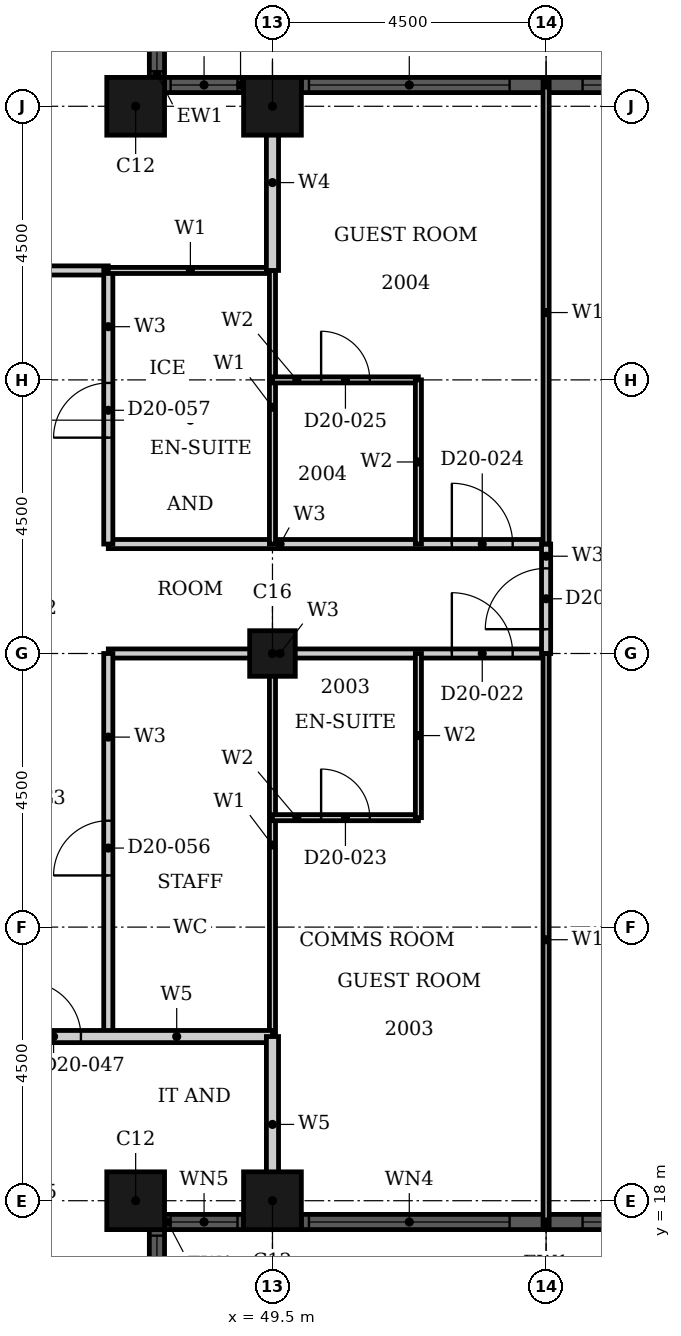
"""IFC4 building model, lengths in metres.
Left out: names, types, materials, properties, quantities, classifications, styles, units other than length and angle.
Written with IfcOpenShell. Run it as: python <this file> out.ifc"""

import sys

from ifc_helpers import new_model, si_unit, direction, frame, frame_2d, origin, origin_2d, place, context, subcontext, project, spatial, rectangle, hollow_rectangle, extrude, element, fill, save


model = new_model("IFC4")
c1 = context("Model", 3, precision=1e-05, world=origin(), true_north=direction((0.0, 1.0)))
c2 = subcontext(c1, "Body", "Model", "MODEL_VIEW")
j1 = project(units=[si_unit("LENGTHUNIT", "METRE"), si_unit("PLANEANGLEUNIT", "RADIAN")], contexts=[c1])
p1 = place(None, origin())
s1 = spatial("IfcSite", under=j1, at=p1, CompositionType="ELEMENT")
p2 = place(p1, origin())
s2 = spatial("IfcBuilding", under=s1, at=p2, CompositionType="ELEMENT")
p3 = place(p2, frame((0.0, 0.0, 85.2)))
s3 = spatial("IfcBuildingStorey", under=s2, at=p3, CompositionType="ELEMENT", Elevation=85.2)
for number, where, z_axis, x_axis in (
    (1, (47.25, 18.0, 0.0), (0.0, 0.0, 1.0), (1.0, 0.0, 0.0)),
    (2, (49.5, 18.0, 0.0), (0.0, 0.0, 1.0), (1.0, 0.0, 0.0)),
    (3, (49.5, 36.0, 0.0), (0.0, 0.0, 1.0), (1.0, 0.0, 0.0)),
    (4, (47.25, 36.0, 0.0), (0.0, 0.0, 1.0), (1.0, 0.0, 0.0)),
):
    element("IfcColumn", number, at=place(p3, frame(where, z_axis=z_axis, x_axis=x_axis)), inside=s3, PredefinedType="COLUMN", context=c2, shape_type="SweptSolid", body=[
        extrude(hollow_rectangle(XDim=0.95, YDim=0.95, WallThickness=0.03, at=origin_2d()), origin(), (0.0, 0.0, 1.0), 3.6),
    ])
p4 = place(p3, frame((49.5, 27.0, 0.0), z_axis=(0.0, 0.0, 1.0), x_axis=(1.0, 0.0, 0.0)))
e5 = element("IfcColumn", 5, at=p4, inside=s3, PredefinedType="COLUMN", context=c2, shape_type="SweptSolid", body=[
    extrude(hollow_rectangle(XDim=0.75, YDim=0.75, WallThickness=0.024, at=origin_2d()), origin(), (0.0, 0.0, 1.0), 3.6),
])
p5 = place(p3, frame((47.6, 16.225, 0.0), z_axis=(0.0, 0.0, 1.0), x_axis=(0.0, 1.0, 0.0)))
e6 = element("IfcWall", 6, at=p5, inside=s3, PredefinedType="SOLIDWALL", context=c2, shape_type="SweptSolid", body=[
    extrude(rectangle(XDim=1.3, YDim=0.25, at=frame_2d((0.65, 0.0))), origin(), (0.0, 0.0, 1.0), 3.6),
])
p6 = place(p5, frame((0.1, 0.0, 0.9)))
e7 = element("IfcOpeningElement", 7, at=p6, cuts=e6, PredefinedType="OPENING", context=c2, shape_type="SweptSolid", body=[
    extrude(rectangle(XDim=1.1, YDim=2.08, at=frame_2d((0.55, 1.04))), frame((0.0, 0.135, 0.0), z_axis=(0.0, -1.0, 0.0), x_axis=(1.0, 0.0, 0.0)), (0.0, 0.0, 1.0), 0.27),
])
p7 = place(p3, frame((47.725, 17.65, 0.0), z_axis=(0.0, 0.0, 1.0), x_axis=(1.0, 0.0, 0.0)))
e8 = element("IfcWall", 8, at=p7, inside=s3, PredefinedType="SOLIDWALL", context=c2, shape_type="SweptSolid", body=[
    extrude(rectangle(XDim=1.3, YDim=0.25, at=frame_2d((0.65, 0.0))), origin(), (0.0, 0.0, 1.0), 3.6),
])
p8 = place(p7, frame((0.1, 0.0, 0.9)))
e9 = element("IfcOpeningElement", 9, at=p8, cuts=e8, PredefinedType="OPENING", context=c2, shape_type="SweptSolid", body=[
    extrude(rectangle(XDim=1.1, YDim=2.08, at=frame_2d((0.55, 1.04))), frame((0.0, 0.135, 0.0), z_axis=(0.0, -1.0, 0.0), x_axis=(1.0, 0.0, 0.0)), (0.0, 0.0, 1.0), 0.27),
])
p9 = place(p3, frame((49.975, 17.65, 0.0), z_axis=(0.0, 0.0, 1.0), x_axis=(1.0, 0.0, 0.0)))
e10 = element("IfcWall", 10, at=p9, inside=s3, PredefinedType="SOLIDWALL", context=c2, shape_type="SweptSolid", body=[
    extrude(rectangle(XDim=8.05, YDim=0.25, at=frame_2d((4.025, 0.0))), origin(), (0.0, 0.0, 1.0), 3.6),
])
p10 = place(p9, frame((0.125, 0.0, 0.9)))
e11 = element("IfcOpeningElement", 11, at=p10, cuts=e10, PredefinedType="OPENING", context=c2, shape_type="SweptSolid", body=[
    extrude(rectangle(XDim=3.3, YDim=2.08, at=frame_2d((1.65, 1.04))), frame((0.0, 0.135, 0.0), z_axis=(0.0, -1.0, 0.0), x_axis=(1.0, 0.0, 0.0)), (0.0, 0.0, 1.0), 0.27),
])
p11 = place(p9, frame((4.625, 0.0, 0.9)))
e12 = element("IfcOpeningElement", 12, at=p11, cuts=e10, PredefinedType="OPENING", context=c2, shape_type="SweptSolid", body=[
    extrude(rectangle(XDim=3.3, YDim=2.08, at=frame_2d((1.65, 1.04))), frame((0.0, 0.135, 0.0), z_axis=(0.0, -1.0, 0.0), x_axis=(1.0, 0.0, 0.0)), (0.0, 0.0, 1.0), 0.27),
])
p12 = place(p3, frame((58.025, 36.35, 0.0), z_axis=(0.0, 0.0, 1.0), x_axis=(-1.0, 0.0, 0.0)))
e13 = element("IfcWall", 13, at=p12, inside=s3, PredefinedType="SOLIDWALL", context=c2, shape_type="SweptSolid", body=[
    extrude(rectangle(XDim=8.05, YDim=0.25, at=frame_2d((4.025, 0.0))), origin(), (0.0, 0.0, 1.0), 3.6),
])
p13 = place(p12, frame((0.125, 0.0, 0.9)))
e14 = element("IfcOpeningElement", 14, at=p13, cuts=e13, PredefinedType="OPENING", context=c2, shape_type="SweptSolid", body=[
    extrude(rectangle(XDim=3.3, YDim=2.08, at=frame_2d((1.65, 1.04))), frame((0.0, 0.135, 0.0), z_axis=(0.0, -1.0, 0.0), x_axis=(1.0, 0.0, 0.0)), (0.0, 0.0, 1.0), 0.27),
])
p14 = place(p12, frame((4.625, 0.0, 0.9)))
e15 = element("IfcOpeningElement", 15, at=p14, cuts=e13, PredefinedType="OPENING", context=c2, shape_type="SweptSolid", body=[
    extrude(rectangle(XDim=3.3, YDim=2.08, at=frame_2d((1.65, 1.04))), frame((0.0, 0.135, 0.0), z_axis=(0.0, -1.0, 0.0), x_axis=(1.0, 0.0, 0.0)), (0.0, 0.0, 1.0), 0.27),
])
p15 = place(p3, frame((49.025, 36.35, 0.0), z_axis=(0.0, 0.0, 1.0), x_axis=(-1.0, 0.0, 0.0)))
e16 = element("IfcWall", 16, at=p15, inside=s3, PredefinedType="SOLIDWALL", context=c2, shape_type="SweptSolid", body=[
    extrude(rectangle(XDim=1.3, YDim=0.25, at=frame_2d((0.65, 0.0))), origin(), (0.0, 0.0, 1.0), 3.6),
])
p16 = place(p15, frame((0.1, 0.0, 0.9)))
e17 = element("IfcOpeningElement", 17, at=p16, cuts=e16, PredefinedType="OPENING", context=c2, shape_type="SweptSolid", body=[
    extrude(rectangle(XDim=1.1, YDim=2.08, at=frame_2d((0.55, 1.04))), frame((0.0, 0.135, 0.0), z_axis=(0.0, -1.0, 0.0), x_axis=(1.0, 0.0, 0.0)), (0.0, 0.0, 1.0), 0.27),
])
p17 = place(p3, frame((47.6, 36.475, 0.0), z_axis=(0.0, 0.0, 1.0), x_axis=(0.0, 1.0, 0.0)))
e18 = element("IfcWall", 18, at=p17, inside=s3, PredefinedType="SOLIDWALL", context=c2, shape_type="SweptSolid", body=[
    extrude(rectangle(XDim=1.3, YDim=0.25, at=frame_2d((0.65, 0.0))), origin(), (0.0, 0.0, 1.0), 3.6),
])
p18 = place(p17, frame((0.1, 0.0, 0.9)))
e19 = element("IfcOpeningElement", 19, at=p18, cuts=e18, PredefinedType="OPENING", context=c2, shape_type="SweptSolid", body=[
    extrude(rectangle(XDim=1.1, YDim=2.08, at=frame_2d((0.55, 1.04))), frame((0.0, 0.135, 0.0), z_axis=(0.0, -1.0, 0.0), x_axis=(1.0, 0.0, 0.0)), (0.0, 0.0, 1.0), 0.27),
])
p19 = place(p3, frame((46.8, 27.0, 0.0), z_axis=(0.0, 0.0, 1.0), x_axis=(1.0, 0.0, 0.0)))
e20 = element("IfcWall", 20, at=p19, inside=s3, PredefinedType="PARTITIONING", context=c2, shape_type="SweptSolid", body=[
    extrude(rectangle(XDim=7.2, YDim=0.15, at=frame_2d((3.6, 0.0))), origin(), (0.0, 0.0, 1.0), 2.58),
])
p20 = place(p19, frame((5.65, 0.0, 0.0)))
e21 = element("IfcOpeningElement", 21, at=p20, cuts=e20, PredefinedType="OPENING", context=c2, shape_type="SweptSolid", body=[
    extrude(rectangle(XDim=1.0, YDim=2.1, at=frame_2d((0.5, 1.05))), frame((0.0, 0.085, 0.0), z_axis=(0.0, -1.0, 0.0), x_axis=(1.0, 0.0, 0.0)), (0.0, 0.0, 1.0), 0.17),
])
p21 = place(p3, frame((46.8, 28.8, 0.0), z_axis=(0.0, 0.0, 1.0), x_axis=(1.0, 0.0, 0.0)))
e22 = element("IfcWall", 22, at=p21, inside=s3, PredefinedType="PARTITIONING", context=c2, shape_type="SweptSolid", body=[
    extrude(rectangle(XDim=7.2, YDim=0.15, at=frame_2d((3.6, 0.0))), origin(), (0.0, 0.0, 1.0), 3.3),
])
p22 = place(p21, frame((5.65, 0.0, 0.0)))
e23 = element("IfcOpeningElement", 23, at=p22, cuts=e22, PredefinedType="OPENING", context=c2, shape_type="SweptSolid", body=[
    extrude(rectangle(XDim=1.0, YDim=2.1, at=frame_2d((0.5, 1.05))), frame((0.0, 0.085, 0.0), z_axis=(0.0, -1.0, 0.0), x_axis=(1.0, 0.0, 0.0)), (0.0, 0.0, 1.0), 0.17),
])
p23 = place(p3, frame((33.3, 33.3, 0.0), z_axis=(0.0, 0.0, 1.0), x_axis=(1.0, 0.0, 0.0)))
e24 = element("IfcWall", 24, at=p23, inside=s3, PredefinedType="PARTITIONING", context=c2, shape_type="SweptSolid", body=[
    extrude(rectangle(XDim=13.5, YDim=0.15, at=frame_2d((6.75, 0.0))), origin(), (0.0, 0.0, 1.0), 3.3),
])
p24 = place(p23, frame((10.15, 0.0, 0.0)))
e25 = element("IfcOpeningElement", 25, at=p24, cuts=e24, PredefinedType="OPENING", context=c2, shape_type="SweptSolid", body=[
    extrude(rectangle(XDim=1.0, YDim=2.1, at=frame_2d((0.5, 1.05))), frame((0.0, 0.085, 0.0), z_axis=(0.0, -1.0, 0.0), x_axis=(1.0, 0.0, 0.0)), (0.0, 0.0, 1.0), 0.17),
])
p25 = place(p23, frame((3.15, 0.0, 0.0)))
e26 = element("IfcOpeningElement", 26, at=p25, cuts=e24, PredefinedType="OPENING", context=c2, shape_type="SweptSolid", body=[
    extrude(rectangle(XDim=0.9, YDim=2.1, at=frame_2d((0.45, 1.05))), frame((0.0, 0.085, 0.0), z_axis=(0.0, -1.0, 0.0), x_axis=(1.0, 0.0, 0.0)), (0.0, 0.0, 1.0), 0.17),
])
p26 = place(p3, frame((46.8, 28.8, 0.0), z_axis=(0.0, 0.0, 1.0), x_axis=(0.0, 1.0, 0.0)))
e27 = element("IfcWall", 27, at=p26, inside=s3, PredefinedType="PARTITIONING", context=c2, shape_type="SweptSolid", body=[
    extrude(rectangle(XDim=4.5, YDim=0.15, at=frame_2d((2.25, 0.0))), origin(), (0.0, 0.0, 1.0), 3.3),
])
p27 = place(p26, frame((1.75, 0.0, 0.0)))
e28 = element("IfcOpeningElement", 28, at=p27, cuts=e27, PredefinedType="OPENING", context=c2, shape_type="SweptSolid", body=[
    extrude(rectangle(XDim=0.9, YDim=2.1, at=frame_2d((0.45, 1.05))), frame((0.0, 0.085, 0.0), z_axis=(0.0, -1.0, 0.0), x_axis=(1.0, 0.0, 0.0)), (0.0, 0.0, 1.0), 0.17),
])
p28 = place(p3, frame((46.8, 20.7, 0.0), z_axis=(0.0, 0.0, 1.0), x_axis=(0.0, 1.0, 0.0)))
e29 = element("IfcWall", 29, at=p28, inside=s3, PredefinedType="PARTITIONING", context=c2, shape_type="SweptSolid", body=[
    extrude(rectangle(XDim=6.3, YDim=0.15, at=frame_2d((3.15, 0.0))), origin(), (0.0, 0.0, 1.0), 3.3),
])
p29 = place(p28, frame((2.65, 0.0, 0.0)))
e30 = element("IfcOpeningElement", 30, at=p29, cuts=e29, PredefinedType="OPENING", context=c2, shape_type="SweptSolid", body=[
    extrude(rectangle(XDim=0.9, YDim=2.1, at=frame_2d((0.45, 1.05))), frame((0.0, 0.085, 0.0), z_axis=(0.0, -1.0, 0.0), x_axis=(1.0, 0.0, 0.0)), (0.0, 0.0, 1.0), 0.17),
])
p30 = place(p3, frame((54.0, 27.0, 0.0), z_axis=(0.0, 0.0, 1.0), x_axis=(0.0, 1.0, 0.0)))
e31 = element("IfcWall", 31, at=p30, inside=s3, PredefinedType="PARTITIONING", context=c2, shape_type="SweptSolid", body=[
    extrude(rectangle(XDim=1.8, YDim=0.15, at=frame_2d((0.9, 0.0))), origin(), (0.0, 0.0, 1.0), 3.3),
])
p31 = place(p30, frame((0.4, 0.0, 0.0)))
e32 = element("IfcOpeningElement", 32, at=p31, cuts=e31, PredefinedType="OPENING", context=c2, shape_type="SweptSolid", body=[
    extrude(rectangle(XDim=1.0, YDim=2.1, at=frame_2d((0.5, 1.05))), frame((0.0, 0.085, 0.0), z_axis=(0.0, -1.0, 0.0), x_axis=(1.0, 0.0, 0.0)), (0.0, 0.0, 1.0), 0.17),
])
p32 = place(p3, frame((46.8, 33.3, 0.0), z_axis=(0.0, 0.0, 1.0), x_axis=(1.0, 0.0, 0.0)))
e33 = element("IfcWall", 33, at=p32, inside=s3, PredefinedType="PARTITIONING", context=c2, shape_type="SweptSolid", body=[
    extrude(rectangle(XDim=2.7, YDim=0.1, at=frame_2d((1.35, 0.0))), origin(), (0.0, 0.0, 1.0), 3.3),
])
p33 = place(p3, frame((49.5, 28.8, 0.0), z_axis=(0.0, 0.0, 1.0), x_axis=(0.0, 1.0, 0.0)))
e34 = element("IfcWall", 34, at=p33, inside=s3, PredefinedType="PARTITIONING", context=c2, shape_type="SweptSolid", body=[
    extrude(rectangle(XDim=4.5, YDim=0.1, at=frame_2d((2.25, 0.0))), origin(), (0.0, 0.0, 1.0), 2.38),
])
p34 = place(p3, frame((49.5, 20.7, 0.0), z_axis=(0.0, 0.0, 1.0), x_axis=(0.0, 1.0, 0.0)))
e35 = element("IfcWall", 35, at=p34, inside=s3, PredefinedType="PARTITIONING", context=c2, shape_type="SweptSolid", body=[
    extrude(rectangle(XDim=6.3, YDim=0.1, at=frame_2d((3.15, 0.0))), origin(), (0.0, 0.0, 1.0), 2.38),
])
p35 = place(p3, frame((54.0, 28.8, 0.0), z_axis=(0.0, 0.0, 1.0), x_axis=(0.0, 1.0, 0.0)))
e36 = element("IfcWall", 36, at=p35, inside=s3, PredefinedType="PARTITIONING", context=c2, shape_type="SweptSolid", body=[
    extrude(rectangle(XDim=7.615, YDim=0.1, at=frame_2d((3.808, 0.0))), origin(), (0.0, 0.0, 1.0), 3.3),
])
p36 = place(p3, frame((54.0, 17.585, 0.0), z_axis=(0.0, 0.0, 1.0), x_axis=(0.0, 1.0, 0.0)))
e37 = element("IfcWall", 37, at=p36, inside=s3, PredefinedType="PARTITIONING", context=c2, shape_type="SweptSolid", body=[
    extrude(rectangle(XDim=9.415, YDim=0.1, at=frame_2d((4.708, 0.0))), origin(), (0.0, 0.0, 1.0), 3.3),
])
p37 = place(p3, frame((49.5, 33.3, 0.0), z_axis=(0.0, 0.0, 1.0), x_axis=(0.0, 1.0, 0.0)))
e38 = element("IfcWall", 38, at=p37, inside=s3, PredefinedType="PARTITIONING", context=c2, shape_type="SweptSolid", body=[
    extrude(rectangle(XDim=2.89, YDim=0.2, at=frame_2d((1.445, 0.0))), origin(), (0.0, 0.0, 1.0), 2.38),
])
p38 = place(p3, frame((49.5, 24.3, 0.0), z_axis=(0.0, 0.0, 1.0), x_axis=(1.0, 0.0, 0.0)))
e39 = element("IfcWall", 39, at=p38, inside=s3, PredefinedType="PARTITIONING", context=c2, shape_type="SweptSolid", body=[
    extrude(rectangle(XDim=2.4, YDim=0.1, at=frame_2d((1.2, 0.0))), origin(), (0.0, 0.0, 1.0), 3.3),
])
p39 = place(p38, frame((0.8, 0.0, 0.0)))
e40 = element("IfcOpeningElement", 40, at=p39, cuts=e39, PredefinedType="OPENING", context=c2, shape_type="SweptSolid", body=[
    extrude(rectangle(XDim=0.8, YDim=2.1, at=frame_2d((0.4, 1.05))), frame((0.0, 0.06, 0.0), z_axis=(0.0, -1.0, 0.0), x_axis=(1.0, 0.0, 0.0)), (0.0, 0.0, 1.0), 0.12),
])
p40 = place(p3, frame((49.5, 31.5, 0.0), z_axis=(0.0, 0.0, 1.0), x_axis=(1.0, 0.0, 0.0)))
e41 = element("IfcWall", 41, at=p40, inside=s3, PredefinedType="PARTITIONING", context=c2, shape_type="SweptSolid", body=[
    extrude(rectangle(XDim=2.4, YDim=0.1, at=frame_2d((1.2, 0.0))), origin(), (0.0, 0.0, 1.0), 2.58),
])
p41 = place(p40, frame((0.8, 0.0, 0.0)))
e42 = element("IfcOpeningElement", 42, at=p41, cuts=e41, PredefinedType="OPENING", context=c2, shape_type="SweptSolid", body=[
    extrude(rectangle(XDim=0.8, YDim=2.1, at=frame_2d((0.4, 1.05))), frame((0.0, 0.06, 0.0), z_axis=(0.0, -1.0, 0.0), x_axis=(1.0, 0.0, 0.0)), (0.0, 0.0, 1.0), 0.12),
])
for number, where, z_axis, x_axis in (
    (43, (51.9, 28.8, 0.0), (0.0, 0.0, 1.0), (0.0, 1.0, 0.0)),
    (44, (51.9, 24.3, 0.0), (0.0, 0.0, 1.0), (0.0, 1.0, 0.0)),
):
    element("IfcWall", number, at=place(p3, frame(where, z_axis=z_axis, x_axis=x_axis)), inside=s3, PredefinedType="PARTITIONING", context=c2, shape_type="SweptSolid", body=[
        extrude(rectangle(XDim=2.7, YDim=0.1, at=frame_2d((1.35, 0.0))), origin(), (0.0, 0.0, 1.0), 3.3),
    ])
p42 = place(p3, frame((45.0, 20.7, 0.0), z_axis=(0.0, 0.0, 1.0), x_axis=(1.0, 0.0, 0.0)))
e45 = element("IfcWall", 45, at=p42, inside=s3, PredefinedType="PARTITIONING", context=c2, shape_type="SweptSolid", body=[
    extrude(rectangle(XDim=4.5, YDim=0.2, at=frame_2d((2.25, 0.0))), origin(), (0.0, 0.0, 1.0), 3.3),
])
p43 = place(p42, frame((0.45, 0.0, 0.0)))
e46 = element("IfcOpeningElement", 46, at=p43, cuts=e45, PredefinedType="OPENING", context=c2, shape_type="SweptSolid", body=[
    extrude(rectangle(XDim=0.9, YDim=2.1, at=frame_2d((0.45, 1.05))), frame((0.0, 0.11, 0.0), z_axis=(0.0, -1.0, 0.0), x_axis=(1.0, 0.0, 0.0)), (0.0, 0.0, 1.0), 0.22),
])
p44 = place(p3, frame((49.5, 17.81, 0.0), z_axis=(0.0, 0.0, 1.0), x_axis=(0.0, 1.0, 0.0)))
e47 = element("IfcWall", 47, at=p44, inside=s3, PredefinedType="PARTITIONING", context=c2, shape_type="SweptSolid", body=[
    extrude(rectangle(XDim=2.89, YDim=0.2, at=frame_2d((1.445, 0.0))), origin(), (0.0, 0.0, 1.0), 2.38),
])
p45 = place(p6, origin())
e48 = element("IfcWindow", 48, at=p45, inside=s3, PartitioningType="SINGLE_PANEL", PredefinedType="WINDOW", context=c2, shape_type="SweptSolid", body=[
    extrude(rectangle(XDim=1.1, YDim=2.08, at=frame_2d((0.55, 1.04))), frame((0.0, 0.03, 0.0), z_axis=(0.0, -1.0, 0.0), x_axis=(1.0, 0.0, 0.0)), (0.0, 0.0, 1.0), 0.06),
])
fill(e7, e48)
p46 = place(p8, origin())
e49 = element("IfcWindow", 49, at=p46, inside=s3, PartitioningType="SINGLE_PANEL", PredefinedType="WINDOW", context=c2, shape_type="SweptSolid", body=[
    extrude(rectangle(XDim=1.1, YDim=2.08, at=frame_2d((0.55, 1.04))), frame((0.0, 0.03, 0.0), z_axis=(0.0, -1.0, 0.0), x_axis=(1.0, 0.0, 0.0)), (0.0, 0.0, 1.0), 0.06),
])
fill(e9, e49)
p47 = place(p10, origin())
e50 = element("IfcWindow", 50, at=p47, inside=s3, PartitioningType="SINGLE_PANEL", PredefinedType="WINDOW", context=c2, shape_type="SweptSolid", body=[
    extrude(rectangle(XDim=3.3, YDim=2.08, at=frame_2d((1.65, 1.04))), frame((0.0, 0.03, 0.0), z_axis=(0.0, -1.0, 0.0), x_axis=(1.0, 0.0, 0.0)), (0.0, 0.0, 1.0), 0.06),
])
fill(e11, e50)
p48 = place(p11, origin())
e51 = element("IfcWindow", 51, at=p48, inside=s3, PartitioningType="SINGLE_PANEL", PredefinedType="WINDOW", context=c2, shape_type="SweptSolid", body=[
    extrude(rectangle(XDim=3.3, YDim=2.08, at=frame_2d((1.65, 1.04))), frame((0.0, 0.03, 0.0), z_axis=(0.0, -1.0, 0.0), x_axis=(1.0, 0.0, 0.0)), (0.0, 0.0, 1.0), 0.06),
])
fill(e12, e51)
p49 = place(p13, origin())
e52 = element("IfcWindow", 52, at=p49, inside=s3, PartitioningType="SINGLE_PANEL", PredefinedType="WINDOW", context=c2, shape_type="SweptSolid", body=[
    extrude(rectangle(XDim=3.3, YDim=2.08, at=frame_2d((1.65, 1.04))), frame((0.0, 0.03, 0.0), z_axis=(0.0, -1.0, 0.0), x_axis=(1.0, 0.0, 0.0)), (0.0, 0.0, 1.0), 0.06),
])
fill(e14, e52)
p50 = place(p14, origin())
e53 = element("IfcWindow", 53, at=p50, inside=s3, PartitioningType="SINGLE_PANEL", PredefinedType="WINDOW", context=c2, shape_type="SweptSolid", body=[
    extrude(rectangle(XDim=3.3, YDim=2.08, at=frame_2d((1.65, 1.04))), frame((0.0, 0.03, 0.0), z_axis=(0.0, -1.0, 0.0), x_axis=(1.0, 0.0, 0.0)), (0.0, 0.0, 1.0), 0.06),
])
fill(e15, e53)
p51 = place(p16, origin())
e54 = element("IfcWindow", 54, at=p51, inside=s3, PartitioningType="SINGLE_PANEL", PredefinedType="WINDOW", context=c2, shape_type="SweptSolid", body=[
    extrude(rectangle(XDim=1.1, YDim=2.08, at=frame_2d((0.55, 1.04))), frame((0.0, 0.03, 0.0), z_axis=(0.0, -1.0, 0.0), x_axis=(1.0, 0.0, 0.0)), (0.0, 0.0, 1.0), 0.06),
])
fill(e17, e54)
p52 = place(p18, origin())
e55 = element("IfcWindow", 55, at=p52, inside=s3, PartitioningType="SINGLE_PANEL", PredefinedType="WINDOW", context=c2, shape_type="SweptSolid", body=[
    extrude(rectangle(XDim=1.1, YDim=2.08, at=frame_2d((0.55, 1.04))), frame((0.0, 0.03, 0.0), z_axis=(0.0, -1.0, 0.0), x_axis=(1.0, 0.0, 0.0)), (0.0, 0.0, 1.0), 0.06),
])
fill(e19, e55)
p53 = place(p20, origin())
e56 = element("IfcDoor", 56, at=p53, inside=s3, OperationType="SINGLE_SWING_RIGHT", PredefinedType="DOOR", context=c2, shape_type="SweptSolid", body=[
    extrude(rectangle(XDim=1.0, YDim=2.1, at=frame_2d((0.5, 1.05))), frame((0.0, 0.025, 0.0), z_axis=(0.0, -1.0, 0.0), x_axis=(1.0, 0.0, 0.0)), (0.0, 0.0, 1.0), 0.05),
])
fill(e21, e56)
p54 = place(p39, origin())
e57 = element("IfcDoor", 57, at=p54, inside=s3, OperationType="SINGLE_SWING_LEFT", PredefinedType="DOOR", context=c2, shape_type="SweptSolid", body=[
    extrude(rectangle(XDim=0.8, YDim=2.1, at=frame_2d((0.4, 1.05))), frame((0.0, 0.025, 0.0), z_axis=(0.0, -1.0, 0.0), x_axis=(1.0, 0.0, 0.0)), (0.0, 0.0, 1.0), 0.05),
])
fill(e40, e57)
p55 = place(p22, origin())
e58 = element("IfcDoor", 58, at=p55, inside=s3, OperationType="SINGLE_SWING_RIGHT", PredefinedType="DOOR", context=c2, shape_type="SweptSolid", body=[
    extrude(rectangle(XDim=1.0, YDim=2.1, at=frame_2d((0.5, 1.05))), frame((0.0, 0.025, 0.0), z_axis=(0.0, -1.0, 0.0), x_axis=(1.0, 0.0, 0.0)), (0.0, 0.0, 1.0), 0.05),
])
fill(e23, e58)
p56 = place(p41, origin())
e59 = element("IfcDoor", 59, at=p56, inside=s3, OperationType="SINGLE_SWING_RIGHT", PredefinedType="DOOR", context=c2, shape_type="SweptSolid", body=[
    extrude(rectangle(XDim=0.8, YDim=2.1, at=frame_2d((0.4, 1.05))), frame((0.0, 0.025, 0.0), z_axis=(0.0, -1.0, 0.0), x_axis=(1.0, 0.0, 0.0)), (0.0, 0.0, 1.0), 0.05),
])
fill(e42, e59)
p57 = place(p31, origin())
e60 = element("IfcDoor", 60, at=p57, inside=s3, OperationType="SINGLE_SWING_LEFT", PredefinedType="DOOR", context=c2, shape_type="SweptSolid", body=[
    extrude(rectangle(XDim=1.0, YDim=2.1, at=frame_2d((0.5, 1.05))), frame((0.0, 0.025, 0.0), z_axis=(0.0, -1.0, 0.0), x_axis=(1.0, 0.0, 0.0)), (0.0, 0.0, 1.0), 0.05),
])
fill(e32, e60)
p58 = place(p43, origin())
e61 = element("IfcDoor", 61, at=p58, inside=s3, OperationType="SINGLE_SWING_LEFT", PredefinedType="DOOR", context=c2, shape_type="SweptSolid", body=[
    extrude(rectangle(XDim=0.9, YDim=2.1, at=frame_2d((0.45, 1.05))), frame((0.0, 0.025, 0.0), z_axis=(0.0, -1.0, 0.0), x_axis=(1.0, 0.0, 0.0)), (0.0, 0.0, 1.0), 0.05),
])
fill(e46, e61)
p59 = place(p29, origin())
e62 = element("IfcDoor", 62, at=p59, inside=s3, OperationType="SINGLE_SWING_RIGHT", PredefinedType="DOOR", context=c2, shape_type="SweptSolid", body=[
    extrude(rectangle(XDim=0.9, YDim=2.1, at=frame_2d((0.45, 1.05))), frame((0.0, 0.025, 0.0), z_axis=(0.0, -1.0, 0.0), x_axis=(1.0, 0.0, 0.0)), (0.0, 0.0, 1.0), 0.05),
])
fill(e30, e62)
p60 = place(p27, origin())
e63 = element("IfcDoor", 63, at=p60, inside=s3, OperationType="SINGLE_SWING_LEFT", PredefinedType="DOOR", context=c2, shape_type="SweptSolid", body=[
    extrude(rectangle(XDim=0.9, YDim=2.1, at=frame_2d((0.45, 1.05))), frame((0.0, 0.025, 0.0), z_axis=(0.0, -1.0, 0.0), x_axis=(1.0, 0.0, 0.0)), (0.0, 0.0, 1.0), 0.05),
])
fill(e28, e63)
save(model, sys.argv[1])
